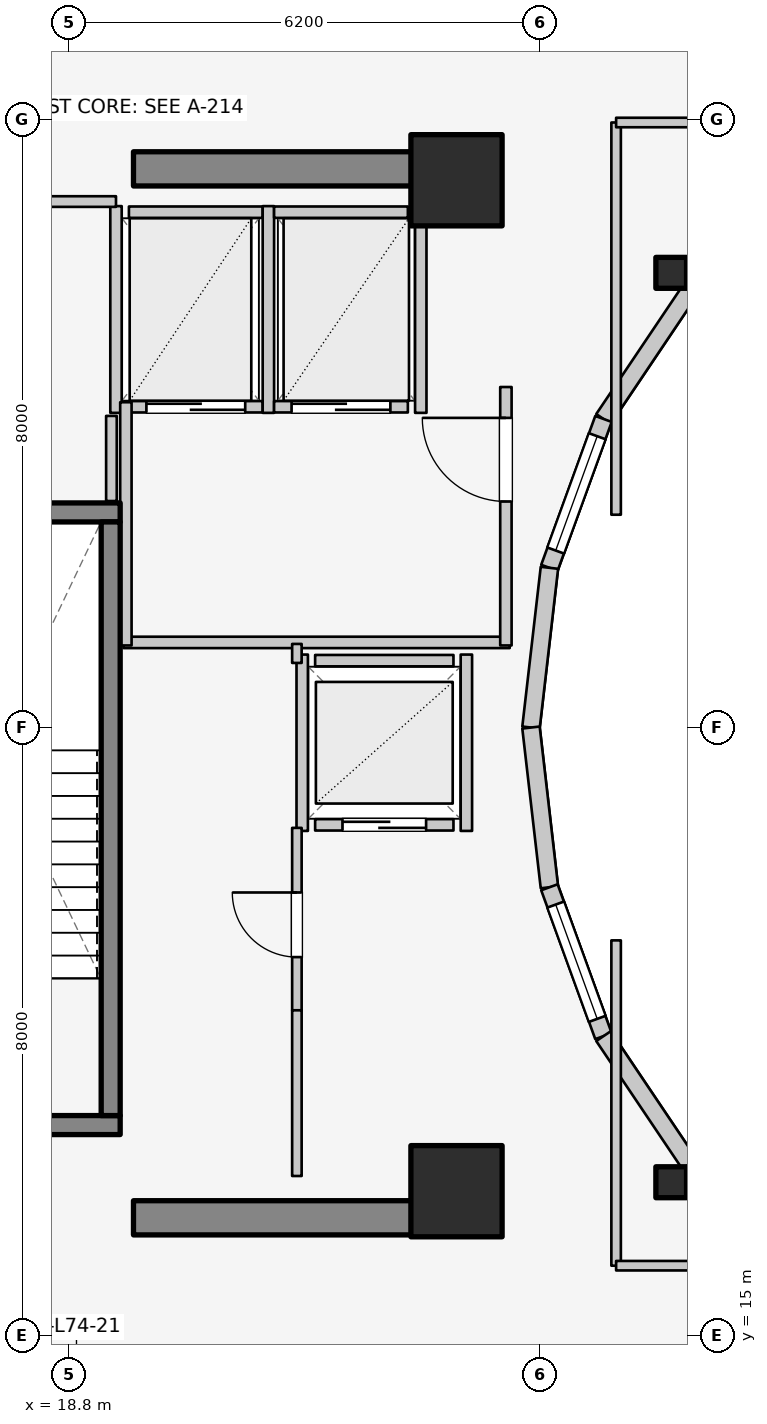
"""IFC4 building model, lengths in metres.
Left out: names, types, materials, properties, quantities, classifications, styles, units other than length and angle.
Written with IfcOpenShell. Run it as: python <this file> out.ifc"""

import sys

from ifc_helpers import new_model, si_unit, direction, frame, frame_2d, origin, origin_2d, place, context, subcontext, project, spatial, rectangle, i_section, extrude, element, fill, save


model = new_model("IFC4")
c1 = context("Model", 3, precision=1e-05, world=origin(), true_north=direction((0.0, 1.0)))
c2 = subcontext(c1, "Body", "Model", "MODEL_VIEW")
j1 = project(units=[si_unit("LENGTHUNIT", "METRE"), si_unit("PLANEANGLEUNIT", "RADIAN")], contexts=[c1])
p1 = place(None, origin())
s1 = spatial("IfcSite", under=j1, at=p1, CompositionType="ELEMENT")
p2 = place(p1, origin())
s2 = spatial("IfcBuilding", under=s1, at=p2, CompositionType="ELEMENT")
p3 = place(p2, frame((0.0, 0.0, 242.4)))
s3 = spatial("IfcBuildingStorey", under=s2, at=p3, CompositionType="ELEMENT", Elevation=242.4)
for number, where, z_axis, x_axis in (
    (1, (19.65, 16.55, 0.0), (0.0, 0.0, 1.0), (1.0, 0.0, 0.0)),
    (2, (19.65, 30.35, 0.0), (0.0, 0.0, 1.0), (1.0, 0.0, 0.0)),
):
    element("IfcWall", number, at=place(p3, frame(where, z_axis=z_axis, x_axis=x_axis)), inside=s3, PredefinedType="SHEAR", context=c2, shape_type="SweptSolid", body=[
        extrude(rectangle(XDim=4.5, YDim=0.45, at=frame_2d((2.25, 0.0))), origin(), (0.0, 0.0, 1.0), 3.6),
    ])
p4 = place(p3, frame((16.105, 17.77, 0.0), z_axis=(0.0, 0.0, 1.0), x_axis=(1.0, 0.0, 0.0)))
e3 = element("IfcWall", 3, at=p4, inside=s3, PredefinedType="SOLIDWALL", context=c2, shape_type="SweptSolid", body=[
    extrude(rectangle(XDim=3.37, YDim=0.25, at=frame_2d((1.685, 0.0))), origin(), (0.0, 0.0, 1.0), 3.6),
])
p5 = place(p4, frame((1.135, 0.0, 0.0)))
e4 = element("IfcOpeningElement", 4, at=p5, cuts=e3, PredefinedType="OPENING", context=c2, shape_type="SweptSolid", body=[
    extrude(rectangle(XDim=1.1, YDim=2.1, at=frame_2d((0.55, 1.05))), frame((0.0, 0.135, 0.0), z_axis=(0.0, -1.0, 0.0), x_axis=(1.0, 0.0, 0.0)), (0.0, 0.0, 1.0), 0.27),
])
p6 = place(p3, frame((16.105, 25.83, 0.0), z_axis=(0.0, 0.0, 1.0), x_axis=(1.0, 0.0, 0.0)))
e5 = element("IfcWall", 5, at=p6, inside=s3, PredefinedType="SOLIDWALL", context=c2, shape_type="SweptSolid", body=[
    extrude(rectangle(XDim=3.37, YDim=0.25, at=frame_2d((1.685, 0.0))), origin(), (0.0, 0.0, 1.0), 3.6),
])
p7 = place(p3, frame((19.35, 17.895, 0.0), z_axis=(0.0, 0.0, 1.0), x_axis=(0.0, 1.0, 0.0)))
e6 = element("IfcWall", 6, at=p7, inside=s3, PredefinedType="SOLIDWALL", context=c2, shape_type="SweptSolid", body=[
    extrude(rectangle(XDim=7.81, YDim=0.25, at=frame_2d((3.905, 0.0))), origin(), (0.0, 0.0, 1.0), 3.6),
])
for number, where, z_axis, x_axis in (
    (7, (23.9, 16.9, 0.0), (0.0, 0.0, 1.0), (1.0, 0.0, 0.0)),
    (8, (23.9, 30.2, 0.0), (0.0, 0.0, 1.0), (1.0, 0.0, 0.0)),
):
    element("IfcColumn", number, at=place(p3, frame(where, z_axis=z_axis, x_axis=x_axis)), inside=s3, PredefinedType="COLUMN", context=c2, shape_type="SweptSolid", body=[
        extrude(rectangle(XDim=1.2, YDim=1.2, at=origin_2d()), origin(), (0.0, 0.0, 1.0), 3.6),
    ])
for number, where, z_axis, x_axis in (
    (9, (26.725, 28.982, 0.0), (0.0, 0.0, 1.0), (1.0, 0.0, 0.0)),
    (10, (26.725, 17.018, 0.0), (0.0, 0.0, 1.0), (1.0, 0.0, 0.0)),
):
    element("IfcColumn", number, at=place(p3, frame(where, z_axis=z_axis, x_axis=x_axis)), inside=s3, PredefinedType="COLUMN", context=c2, shape_type="SweptSolid", body=[
        extrude(i_section(OverallWidth=0.404, OverallDepth=0.407, WebThickness=0.027, FlangeThickness=0.044, FilletRadius=0.025, at=origin_2d()), origin(), (0.0, 0.0, 1.0), 3.6),
    ])
p8 = place(p3, frame((28.44, 30.032, 0.0), z_axis=(0.0, 0.0, 1.0), x_axis=(-0.752576694707, -0.658504607869, 0.0)))
e11 = element("IfcWall", 11, at=p8, inside=s3, PredefinedType="STANDARD", context=c2, shape_type="SweptSolid", body=[
    extrude(rectangle(XDim=1.959, YDim=0.23, at=frame_2d((0.98, 0.0))), origin(), (0.0, 0.0, 1.0), 2.6),
])
p9 = place(p3, frame((26.965, 28.742, 0.0), z_axis=(0.0, 0.0, 1.0), x_axis=(-0.558197800898, -0.829707909492, 0.0)))
e12 = element("IfcWall", 12, at=p9, inside=s3, PredefinedType="STANDARD", context=c2, shape_type="SweptSolid", body=[
    extrude(rectangle(XDim=2.027, YDim=0.23, at=frame_2d((1.013, 0.0))), origin(), (0.0, 0.0, 1.0), 2.6),
])
p10 = place(p3, frame((25.834, 27.06, 0.0), z_axis=(0.0, 0.0, 1.0), x_axis=(-0.341423187295, -0.93990968033, 0.0)))
e13 = element("IfcWall", 13, at=p10, inside=s3, PredefinedType="STANDARD", context=c2, shape_type="SweptSolid", body=[
    extrude(rectangle(XDim=2.084, YDim=0.23, at=frame_2d((1.042, 0.0))), origin(), (0.0, 0.0, 1.0), 3.28),
])
p11 = place(p10, frame((0.242, 0.0, 0.85)))
e14 = element("IfcOpeningElement", 14, at=p11, cuts=e13, PredefinedType="OPENING", context=c2, shape_type="SweptSolid", body=[
    extrude(rectangle(XDim=1.6, YDim=1.65, at=frame_2d((0.8, 0.825))), frame((0.0, 0.125, 0.0), z_axis=(0.0, -1.0, 0.0), x_axis=(1.0, 0.0, 0.0)), (0.0, 0.0, 1.0), 0.25),
])
for number, where, z_axis, x_axis in (
    (15, (25.123, 25.102, 0.0), (0.0, 0.0, 1.0), (-0.115, -0.993, 0.0)),
    (16, (24.88, 23.0, 0.0), (0.0, 0.0, 1.0), (0.115, -0.993, 0.0)),
):
    element("IfcWall", number, at=place(p3, frame(where, z_axis=z_axis, x_axis=x_axis)), inside=s3, PredefinedType="STANDARD", context=c2, shape_type="SweptSolid", body=[
        extrude(rectangle(XDim=2.115, YDim=0.23, at=frame_2d((1.058, 0.0))), origin(), (0.0, 0.0, 1.0), 3.28),
    ])
p12 = place(p3, frame((25.123, 20.898, 0.0), z_axis=(0.0, 0.0, 1.0), x_axis=(0.341423187295, -0.93990968033, 0.0)))
e17 = element("IfcWall", 17, at=p12, inside=s3, PredefinedType="STANDARD", context=c2, shape_type="SweptSolid", body=[
    extrude(rectangle(XDim=2.084, YDim=0.23, at=frame_2d((1.042, 0.0))), origin(), (0.0, 0.0, 1.0), 3.28),
])
p13 = place(p12, frame((0.242, 0.0, 0.85)))
e18 = element("IfcOpeningElement", 18, at=p13, cuts=e17, PredefinedType="OPENING", context=c2, shape_type="SweptSolid", body=[
    extrude(rectangle(XDim=1.6, YDim=1.65, at=frame_2d((0.8, 0.825))), frame((0.0, 0.125, 0.0), z_axis=(0.0, -1.0, 0.0), x_axis=(1.0, 0.0, 0.0)), (0.0, 0.0, 1.0), 0.25),
])
p14 = place(p3, frame((25.834, 18.94, 0.0), z_axis=(0.0, 0.0, 1.0), x_axis=(0.558197800898, -0.829707909492, 0.0)))
e19 = element("IfcWall", 19, at=p14, inside=s3, PredefinedType="STANDARD", context=c2, shape_type="SweptSolid", body=[
    extrude(rectangle(XDim=2.027, YDim=0.23, at=frame_2d((1.013, 0.0))), origin(), (0.0, 0.0, 1.0), 2.6),
])
p15 = place(p3, frame((26.965, 17.258, 0.0), z_axis=(0.0, 0.0, 1.0), x_axis=(0.752576694707, -0.658504607869, 0.0)))
e20 = element("IfcWall", 20, at=p15, inside=s3, PredefinedType="STANDARD", context=c2, shape_type="SweptSolid", body=[
    extrude(rectangle(XDim=1.959, YDim=0.23, at=frame_2d((0.98, 0.0))), origin(), (0.0, 0.0, 1.0), 2.6),
])
p16 = place(p3, frame((22.04, 21.72, 0.0), z_axis=(0.0, 0.0, 1.0), x_axis=(1.0, 0.0, 0.0)))
e21 = element("IfcWall", 21, at=p16, inside=s3, PredefinedType="SOLIDWALL", context=c2, shape_type="SweptSolid", body=[
    extrude(rectangle(XDim=1.82, YDim=0.15, at=frame_2d((0.91, 0.0))), origin(), (0.0, 0.0, 1.0), 2.62),
])
p17 = place(p16, frame((0.36, 0.0, 0.0)))
e22 = element("IfcOpeningElement", 22, at=p17, cuts=e21, PredefinedType="OPENING", context=c2, shape_type="SweptSolid", body=[
    extrude(rectangle(XDim=1.1, YDim=2.1, at=frame_2d((0.55, 1.05))), frame((0.0, 0.085, 0.0), z_axis=(0.0, -1.0, 0.0), x_axis=(1.0, 0.0, 0.0)), (0.0, 0.0, 1.0), 0.17),
])
p18 = place(p3, frame((22.04, 23.88, 0.0), z_axis=(0.0, 0.0, 1.0), x_axis=(1.0, 0.0, 0.0)))
e23 = element("IfcWall", 23, at=p18, inside=s3, PredefinedType="SOLIDWALL", context=c2, shape_type="SweptSolid", body=[
    extrude(rectangle(XDim=1.82, YDim=0.15, at=frame_2d((0.91, 0.0))), origin(), (0.0, 0.0, 1.0), 2.62),
])
p19 = place(p3, frame((21.87, 21.64, 0.0), z_axis=(0.0, 0.0, 1.0), x_axis=(0.0, 1.0, 0.0)))
e24 = element("IfcWall", 24, at=p19, inside=s3, PredefinedType="SOLIDWALL", context=c2, shape_type="SweptSolid", body=[
    extrude(rectangle(XDim=2.32, YDim=0.15, at=frame_2d((1.16, 0.0))), origin(), (0.0, 0.0, 1.0), 3.295),
])
p20 = place(p3, frame((24.03, 21.64, 0.0), z_axis=(0.0, 0.0, 1.0), x_axis=(0.0, 1.0, 0.0)))
e25 = element("IfcWall", 25, at=p20, inside=s3, PredefinedType="SOLIDWALL", context=c2, shape_type="SweptSolid", body=[
    extrude(rectangle(XDim=2.32, YDim=0.15, at=frame_2d((1.16, 0.0))), origin(), (0.0, 0.0, 1.0), 2.62),
])
p21 = place(p3, frame((19.59, 27.22, 0.0), z_axis=(0.0, 0.0, 1.0), x_axis=(1.0, 0.0, 0.0)))
e26 = element("IfcWall", 26, at=p21, inside=s3, PredefinedType="SOLIDWALL", context=c2, shape_type="SweptSolid", body=[
    extrude(rectangle(XDim=1.76, YDim=0.15, at=frame_2d((0.88, 0.0))), origin(), (0.0, 0.0, 1.0), 3.295),
])
p22 = place(p21, frame((0.23, 0.0, 0.0)))
e27 = element("IfcOpeningElement", 27, at=p22, cuts=e26, PredefinedType="OPENING", context=c2, shape_type="SweptSolid", body=[
    extrude(rectangle(XDim=1.3, YDim=2.1, at=frame_2d((0.65, 1.05))), frame((0.0, 0.085, 0.0), z_axis=(0.0, -1.0, 0.0), x_axis=(1.0, 0.0, 0.0)), (0.0, 0.0, 1.0), 0.17),
])
p23 = place(p3, frame((19.59, 29.78, 0.0), z_axis=(0.0, 0.0, 1.0), x_axis=(1.0, 0.0, 0.0)))
e28 = element("IfcWall", 28, at=p23, inside=s3, PredefinedType="SOLIDWALL", context=c2, shape_type="SweptSolid", body=[
    extrude(rectangle(XDim=1.76, YDim=0.15, at=frame_2d((0.88, 0.0))), origin(), (0.0, 0.0, 1.0), 3.295),
])
for number, where, z_axis, x_axis in (
    (29, (19.42, 27.14, 0.0), (0.0, 0.0, 1.0), (0.0, 1.0, 0.0)),
    (30, (21.425, 27.14, 0.0), (0.0, 0.0, 1.0), (0.0, 1.0, 0.0)),
):
    element("IfcWall", number, at=place(p3, frame(where, z_axis=z_axis, x_axis=x_axis)), inside=s3, PredefinedType="SOLIDWALL", context=c2, shape_type="SweptSolid", body=[
        extrude(rectangle(XDim=2.72, YDim=0.15, at=frame_2d((1.36, 0.0))), origin(), (0.0, 0.0, 1.0), 3.295),
    ])
p24 = place(p3, frame((21.5, 27.22, 0.0), z_axis=(0.0, 0.0, 1.0), x_axis=(1.0, 0.0, 0.0)))
e31 = element("IfcWall", 31, at=p24, inside=s3, PredefinedType="SOLIDWALL", context=c2, shape_type="SweptSolid", body=[
    extrude(rectangle(XDim=1.76, YDim=0.15, at=frame_2d((0.88, 0.0))), origin(), (0.0, 0.0, 1.0), 3.295),
])
p25 = place(p24, frame((0.23, 0.0, 0.0)))
e32 = element("IfcOpeningElement", 32, at=p25, cuts=e31, PredefinedType="OPENING", context=c2, shape_type="SweptSolid", body=[
    extrude(rectangle(XDim=1.3, YDim=2.1, at=frame_2d((0.65, 1.05))), frame((0.0, 0.085, 0.0), z_axis=(0.0, -1.0, 0.0), x_axis=(1.0, 0.0, 0.0)), (0.0, 0.0, 1.0), 0.17),
])
p26 = place(p3, frame((21.5, 29.78, 0.0), z_axis=(0.0, 0.0, 1.0), x_axis=(1.0, 0.0, 0.0)))
e33 = element("IfcWall", 33, at=p26, inside=s3, PredefinedType="SOLIDWALL", context=c2, shape_type="SweptSolid", body=[
    extrude(rectangle(XDim=1.76, YDim=0.15, at=frame_2d((0.88, 0.0))), origin(), (0.0, 0.0, 1.0), 3.295),
])
p27 = place(p3, frame((23.43, 27.14, 0.0), z_axis=(0.0, 0.0, 1.0), x_axis=(0.0, 1.0, 0.0)))
e34 = element("IfcWall", 34, at=p27, inside=s3, PredefinedType="SOLIDWALL", context=c2, shape_type="SweptSolid", body=[
    extrude(rectangle(XDim=2.72, YDim=0.15, at=frame_2d((1.36, 0.0))), origin(), (0.0, 0.0, 1.0), 3.295),
])
p28 = place(p3, frame((19.52, 24.12, 0.0), z_axis=(0.0, 0.0, 1.0), x_axis=(1.0, 0.0, 0.0)))
e35 = element("IfcWall", 35, at=p28, inside=s3, PredefinedType="PARTITIONING", context=c2, shape_type="SweptSolid", body=[
    extrude(rectangle(XDim=5.08, YDim=0.15, at=frame_2d((2.54, 0.0))), origin(), (0.0, 0.0, 1.0), 2.62),
])
p29 = place(p3, frame((19.55, 24.08, 0.0), z_axis=(0.0, 0.0, 1.0), x_axis=(0.0, 1.0, 0.0)))
e36 = element("IfcWall", 36, at=p29, inside=s3, PredefinedType="PARTITIONING", context=c2, shape_type="SweptSolid", body=[
    extrude(rectangle(XDim=3.2, YDim=0.15, at=frame_2d((1.6, 0.0))), origin(), (0.0, 0.0, 1.0), 3.295),
])
p30 = place(p3, frame((24.55, 24.08, 0.0), z_axis=(0.0, 0.0, 1.0), x_axis=(0.0, 1.0, 0.0)))
e37 = element("IfcWall", 37, at=p30, inside=s3, PredefinedType="PARTITIONING", context=c2, shape_type="SweptSolid", body=[
    extrude(rectangle(XDim=3.4, YDim=0.15, at=frame_2d((1.7, 0.0))), origin(), (0.0, 0.0, 1.0), 3.295),
])
p31 = place(p30, frame((1.894, 0.0, 0.0)))
e38 = element("IfcOpeningElement", 38, at=p31, cuts=e37, PredefinedType="OPENING", context=c2, shape_type="SweptSolid", body=[
    extrude(rectangle(XDim=1.1, YDim=2.1, at=frame_2d((0.55, 1.05))), frame((0.0, 0.085, 0.0), z_axis=(0.0, -1.0, 0.0), x_axis=(1.0, 0.0, 0.0)), (0.0, 0.0, 1.0), 0.17),
])
p32 = place(p3, frame((21.8, 19.28, 0.0), z_axis=(0.0, 0.0, 1.0), x_axis=(0.0, 1.0, 0.0)))
e39 = element("IfcWall", 39, at=p32, inside=s3, PredefinedType="PARTITIONING", context=c2, shape_type="SweptSolid", body=[
    extrude(rectangle(XDim=2.4, YDim=0.125, at=frame_2d((1.2, 0.0))), origin(), (0.0, 0.0, 1.0), 3.295),
])
p33 = place(p32, frame((0.7, 0.0, 0.0)))
e40 = element("IfcOpeningElement", 40, at=p33, cuts=e39, PredefinedType="OPENING", context=c2, shape_type="SweptSolid", body=[
    extrude(rectangle(XDim=0.85, YDim=2.05, at=frame_2d((0.425, 1.025))), frame((0.0, 0.073, 0.0), z_axis=(0.0, -1.0, 0.0), x_axis=(1.0, 0.0, 0.0)), (0.0, 0.0, 1.0), 0.145),
])
p34 = place(p3, frame((21.8, 23.85, 0.0), z_axis=(0.0, 0.0, 1.0), x_axis=(0.0, 1.0, 0.0)))
e41 = element("IfcWall", 41, at=p34, inside=s3, PredefinedType="PARTITIONING", context=c2, shape_type="SweptSolid", body=[
    extrude(rectangle(XDim=0.25, YDim=0.125, at=frame_2d((0.125, 0.0))), origin(), (0.0, 0.0, 1.0), 3.295),
])
p35 = place(p3, frame((21.8, 17.1, 0.0), z_axis=(0.0, 0.0, 1.0), x_axis=(0.0, 1.0, 0.0)))
e42 = element("IfcWall", 42, at=p35, inside=s3, PredefinedType="PARTITIONING", context=c2, shape_type="SweptSolid", body=[
    extrude(rectangle(XDim=2.18, YDim=0.125, at=frame_2d((1.09, 0.0))), origin(), (0.0, 0.0, 1.0), 3.295),
])
p36 = place(p3, frame((16.12, 29.92, 0.0), z_axis=(0.0, 0.0, 1.0), x_axis=(1.0, 0.0, 0.0)))
e43 = element("IfcWall", 43, at=p36, inside=s3, PredefinedType="PLUMBINGWALL", context=c2, shape_type="SweptSolid", body=[
    extrude(rectangle(XDim=3.3, YDim=0.14, at=frame_2d((1.65, 0.0))), origin(), (0.0, 0.0, 1.0), 3.295),
])
p37 = place(p36, frame((1.399, 0.0, 0.0)))
e44 = element("IfcOpeningElement", 44, at=p37, cuts=e43, PredefinedType="OPENING", context=c2, shape_type="SweptSolid", body=[
    extrude(rectangle(XDim=0.85, YDim=2.05, at=frame_2d((0.425, 1.025))), frame((0.0, 0.08, 0.0), z_axis=(0.0, -1.0, 0.0), x_axis=(1.0, 0.0, 0.0)), (0.0, 0.0, 1.0), 0.16),
])
p38 = place(p3, frame((19.36, 25.98, 0.0), z_axis=(0.0, 0.0, 1.0), x_axis=(0.0, 1.0, 0.0)))
e45 = element("IfcWall", 45, at=p38, inside=s3, PredefinedType="PLUMBINGWALL", context=c2, shape_type="SweptSolid", body=[
    extrude(rectangle(XDim=1.12, YDim=0.14, at=frame_2d((0.56, 0.0))), origin(), (0.0, 0.0, 1.0), 3.295),
])
p39 = place(p3, frame((28.45, 30.015, 0.0), z_axis=(0.0, 0.0, 1.0), x_axis=(-0.523992004803, 0.851723182086, 0.0)))
e46 = element("IfcWall", 46, at=p39, inside=s3, PredefinedType="PARTITIONING", context=c2, shape_type="SweptSolid", body=[
    extrude(rectangle(XDim=3.101, YDim=0.125, at=frame_2d((1.551, 0.0))), origin(), (0.0, 0.0, 1.0), 2.672),
])
p40 = place(p3, frame((26.0, 25.8, 0.0), z_axis=(0.0, 0.0, 1.0), x_axis=(0.0, 1.0, 0.0)))
e47 = element("IfcWall", 47, at=p40, inside=s3, PredefinedType="PARTITIONING", context=c2, shape_type="SweptSolid", body=[
    extrude(rectangle(XDim=5.16, YDim=0.125, at=frame_2d((2.58, 0.0))), origin(), (0.0, 0.0, 1.0), 2.672),
])
p41 = place(p3, frame((26.0, 30.96, 0.0), z_axis=(0.0, 0.0, 1.0), x_axis=(1.0, 0.0, 0.0)))
e48 = element("IfcWall", 48, at=p41, inside=s3, PredefinedType="PARTITIONING", context=c2, shape_type="SweptSolid", body=[
    extrude(rectangle(XDim=2.6, YDim=0.125, at=frame_2d((1.3, 0.0))), origin(), (0.0, 0.0, 1.0), 2.816),
])
p42 = place(p3, frame((26.0, 15.92, 0.0), z_axis=(0.0, 0.0, 1.0), x_axis=(0.0, 1.0, 0.0)))
e49 = element("IfcWall", 49, at=p42, inside=s3, PredefinedType="PARTITIONING", context=c2, shape_type="SweptSolid", body=[
    extrude(rectangle(XDim=4.28, YDim=0.125, at=frame_2d((2.14, 0.0))), origin(), (0.0, 0.0, 1.0), 2.672),
])
p43 = place(p3, frame((26.0, 15.92, 0.0), z_axis=(0.0, 0.0, 1.0), x_axis=(1.0, 0.0, 0.0)))
e50 = element("IfcWall", 50, at=p43, inside=s3, PredefinedType="PARTITIONING", context=c2, shape_type="SweptSolid", body=[
    extrude(rectangle(XDim=2.6, YDim=0.125, at=frame_2d((1.3, 0.0))), origin(), (0.0, 0.0, 1.0), 2.672),
])
p44 = place(p11, origin())
e51 = element("IfcWindow", 51, at=p44, inside=s3, PartitioningType="SINGLE_PANEL", PredefinedType="WINDOW", context=c2, shape_type="SweptSolid", body=[
    extrude(rectangle(XDim=1.6, YDim=1.65, at=frame_2d((0.8, 0.825))), frame((0.0, 0.03, 0.0), z_axis=(0.0, -1.0, 0.0), x_axis=(1.0, 0.0, 0.0)), (0.0, 0.0, 1.0), 0.06),
])
fill(e14, e51)
p45 = place(p13, origin())
e52 = element("IfcWindow", 52, at=p45, inside=s3, PartitioningType="SINGLE_PANEL", PredefinedType="WINDOW", context=c2, shape_type="SweptSolid", body=[
    extrude(rectangle(XDim=1.6, YDim=1.65, at=frame_2d((0.8, 0.825))), frame((0.0, 0.03, 0.0), z_axis=(0.0, -1.0, 0.0), x_axis=(1.0, 0.0, 0.0)), (0.0, 0.0, 1.0), 0.06),
])
fill(e18, e52)
p46 = place(p17, origin())
e53 = element("IfcDoor", 53, at=p46, inside=s3, OperationType="DOUBLE_DOOR_SLIDING", PredefinedType="DOOR", context=c2, shape_type="SweptSolid", body=[
    extrude(rectangle(XDim=1.1, YDim=2.1, at=frame_2d((0.55, 1.05))), frame((0.0, 0.025, 0.0), z_axis=(0.0, -1.0, 0.0), x_axis=(1.0, 0.0, 0.0)), (0.0, 0.0, 1.0), 0.05),
])
fill(e22, e53)
p47 = place(p22, origin())
e54 = element("IfcDoor", 54, at=p47, inside=s3, OperationType="DOUBLE_DOOR_SLIDING", PredefinedType="DOOR", context=c2, shape_type="SweptSolid", body=[
    extrude(rectangle(XDim=1.3, YDim=2.1, at=frame_2d((0.65, 1.05))), frame((0.0, 0.025, 0.0), z_axis=(0.0, -1.0, 0.0), x_axis=(1.0, 0.0, 0.0)), (0.0, 0.0, 1.0), 0.05),
])
fill(e27, e54)
p48 = place(p25, origin())
e55 = element("IfcDoor", 55, at=p48, inside=s3, OperationType="DOUBLE_DOOR_SLIDING", PredefinedType="DOOR", context=c2, shape_type="SweptSolid", body=[
    extrude(rectangle(XDim=1.3, YDim=2.1, at=frame_2d((0.65, 1.05))), frame((0.0, 0.025, 0.0), z_axis=(0.0, -1.0, 0.0), x_axis=(1.0, 0.0, 0.0)), (0.0, 0.0, 1.0), 0.05),
])
fill(e32, e55)
p49 = place(p31, origin())
e56 = element("IfcDoor", 56, at=p49, inside=s3, OperationType="SINGLE_SWING_RIGHT", PredefinedType="DOOR", context=c2, shape_type="SweptSolid", body=[
    extrude(rectangle(XDim=1.1, YDim=2.1, at=frame_2d((0.55, 1.05))), frame((0.0, 0.025, 0.0), z_axis=(0.0, -1.0, 0.0), x_axis=(1.0, 0.0, 0.0)), (0.0, 0.0, 1.0), 0.05),
])
fill(e38, e56)
p50 = place(p33, origin())
e57 = element("IfcDoor", 57, at=p50, inside=s3, OperationType="SINGLE_SWING_RIGHT", PredefinedType="DOOR", context=c2, shape_type="SweptSolid", body=[
    extrude(rectangle(XDim=0.85, YDim=2.05, at=frame_2d((0.425, 1.025))), frame((0.0, 0.025, 0.0), z_axis=(0.0, -1.0, 0.0), x_axis=(1.0, 0.0, 0.0)), (0.0, 0.0, 1.0), 0.05),
])
fill(e40, e57)
save(model, sys.argv[1])
